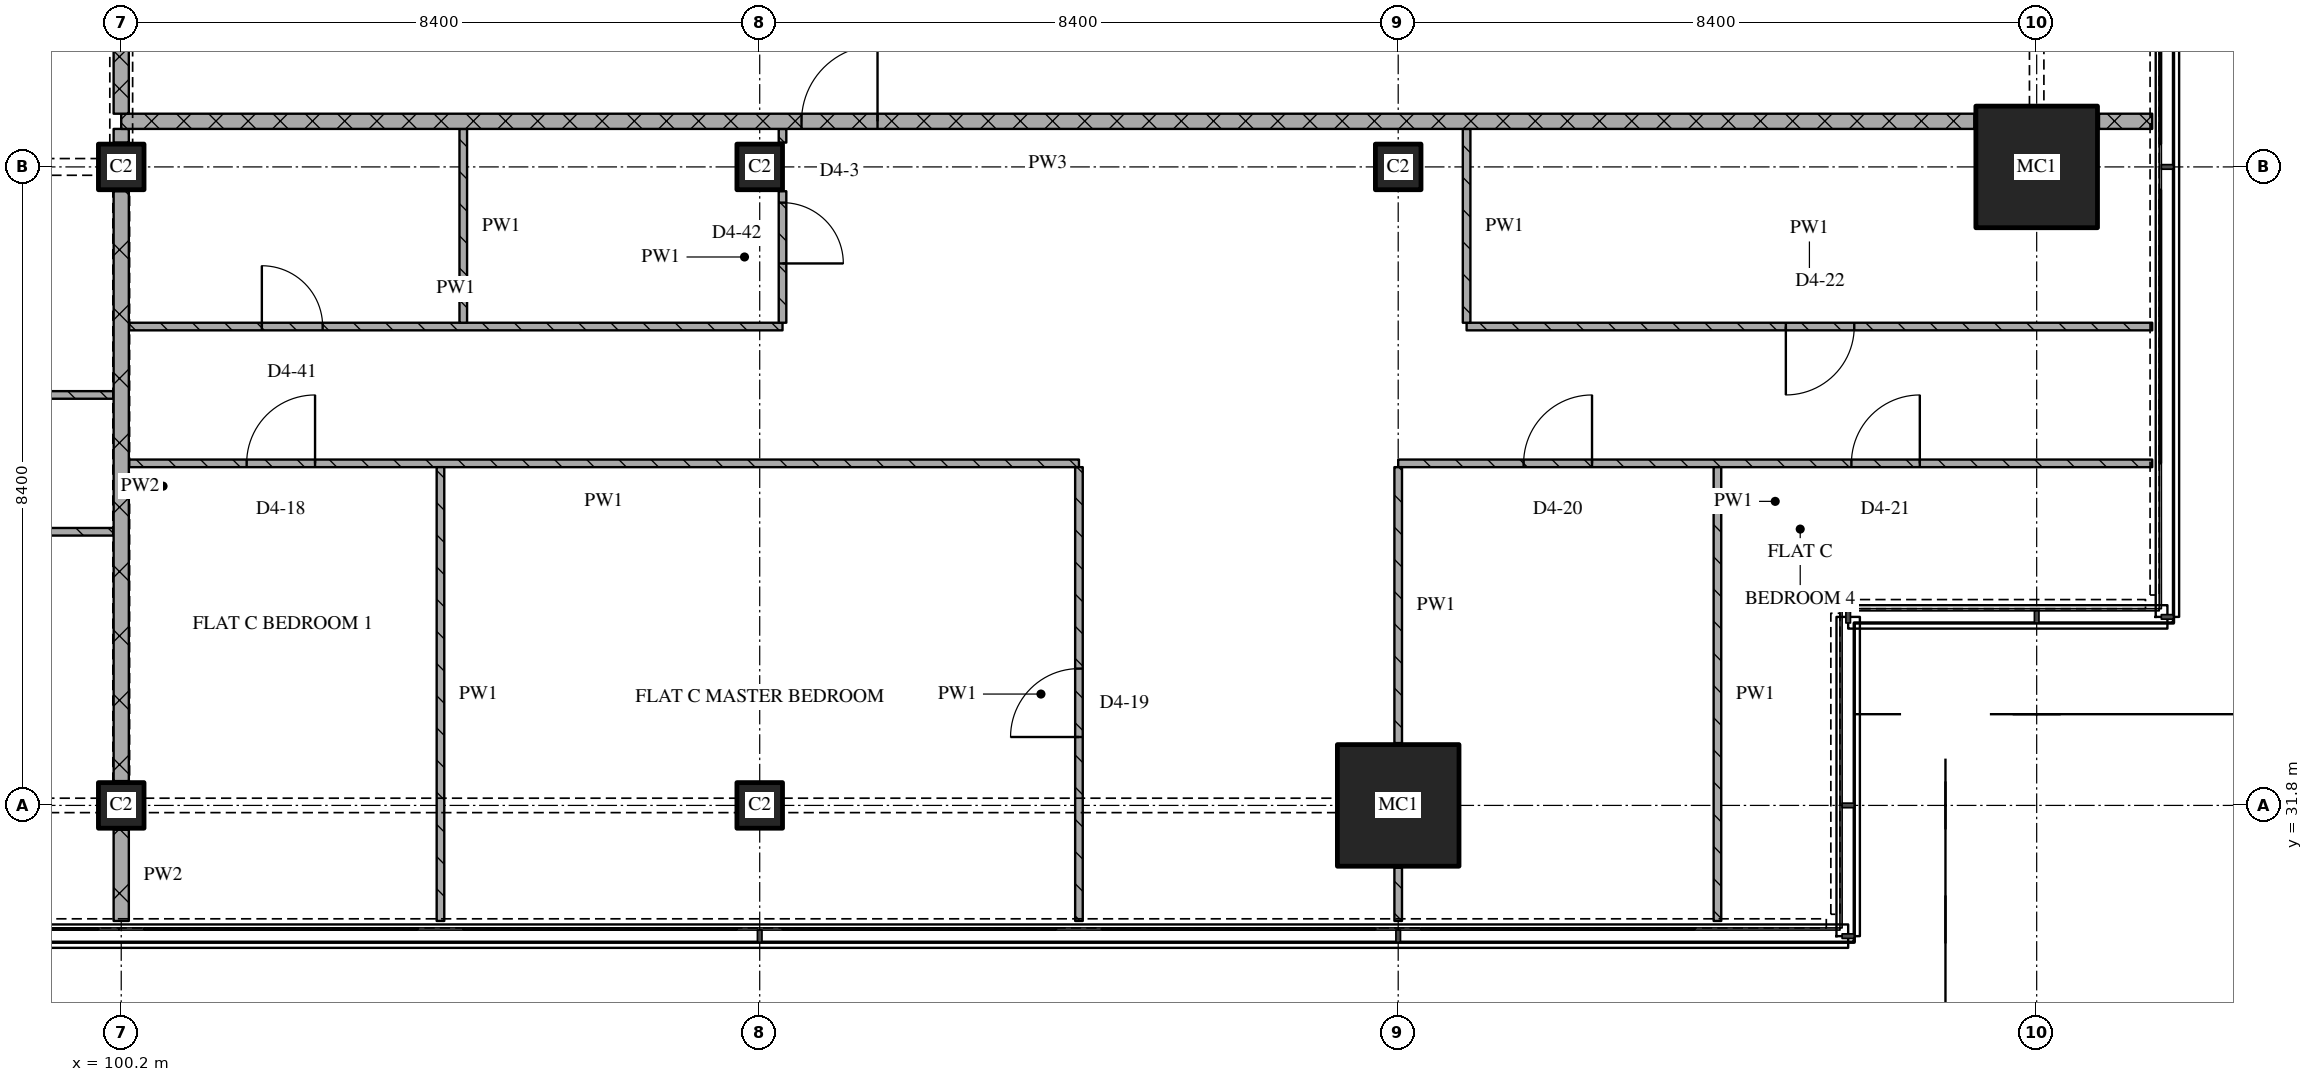
"""IFC4 building model, lengths in metres.
Left out: names, types, materials, properties, quantities, classifications, styles, units other than length and angle.
Written with IfcOpenShell. Run it as: python <this file> out.ifc"""

import sys

from ifc_helpers import new_model, si_unit, direction, frame, frame_2d, origin, origin_2d, place, context, subcontext, project, spatial, rectangle, extrude, element, fill, save


model = new_model("IFC4")
c1 = context("Model", 3, precision=1e-05, world=origin(), true_north=direction((0.0, 1.0)))
c2 = subcontext(c1, "Body", "Model", "MODEL_VIEW")
j1 = project(units=[si_unit("LENGTHUNIT", "METRE"), si_unit("PLANEANGLEUNIT", "RADIAN")], contexts=[c1])
p1 = place(None, origin())
s1 = spatial("IfcSite", under=j1, at=p1, CompositionType="ELEMENT")
p2 = place(p1, origin())
s2 = spatial("IfcBuilding", under=s1, at=p2, CompositionType="ELEMENT")
p3 = place(p2, frame((0.0, 0.0, 237.9)))
s3 = spatial("IfcBuildingStorey", under=s2, at=p3, CompositionType="ELEMENT", Elevation=237.9)
for number, where, z_axis, x_axis in (
    (1, (100.2, 31.8, 0.0), (0.0, 0.0, 1.0), (1.0, 0.0, 0.0)),
    (2, (100.2, 40.2, 0.0), (0.0, 0.0, 1.0), (1.0, 0.0, 0.0)),
    (3, (108.6, 31.8, 0.0), (0.0, 0.0, 1.0), (1.0, 0.0, 0.0)),
    (4, (108.6, 40.2, 0.0), (0.0, 0.0, 1.0), (1.0, 0.0, 0.0)),
):
    element("IfcColumn", number, at=place(p3, frame(where, z_axis=z_axis, x_axis=x_axis)), inside=s3, PredefinedType="COLUMN", context=c2, shape_type="SweptSolid", body=[
        extrude(rectangle(XDim=0.6, YDim=0.6, at=origin_2d()), origin(), (0.0, 0.0, 1.0), 3.6),
    ])
p4 = place(p3, frame((117.0, 31.8, 0.0), z_axis=(0.0, 0.0, 1.0), x_axis=(1.0, 0.0, 0.0)))
e5 = element("IfcColumn", 5, at=p4, inside=s3, PredefinedType="COLUMN", context=c2, shape_type="SweptSolid", body=[
    extrude(rectangle(XDim=1.6, YDim=1.6, at=origin_2d()), origin(), (0.0, 0.0, 1.0), 3.6),
])
p5 = place(p3, frame((117.0, 40.2, 0.0), z_axis=(0.0, 0.0, 1.0), x_axis=(1.0, 0.0, 0.0)))
e6 = element("IfcColumn", 6, at=p5, inside=s3, PredefinedType="COLUMN", context=c2, shape_type="SweptSolid", body=[
    extrude(rectangle(XDim=0.6, YDim=0.6, at=origin_2d()), origin(), (0.0, 0.0, 1.0), 3.6),
])
p6 = place(p3, frame((125.4, 40.2, 0.0), z_axis=(0.0, 0.0, 1.0), x_axis=(1.0, 0.0, 0.0)))
e7 = element("IfcColumn", 7, at=p6, inside=s3, PredefinedType="COLUMN", context=c2, shape_type="SweptSolid", body=[
    extrude(rectangle(XDim=1.6, YDim=1.6, at=origin_2d()), origin(), (0.0, 0.0, 1.0), 3.6),
])
p7 = place(p3, frame((100.1, 35.4, 0.0), z_axis=(0.0, 0.0, 1.0), x_axis=(-1.0, 0.0, 0.0)))
e8 = element("IfcWall", 8, at=p7, inside=s3, PredefinedType="PARTITIONING", context=c2, shape_type="SweptSolid", body=[
    extrude(rectangle(XDim=20.9, YDim=0.1, at=frame_2d((10.45, 0.0))), origin(), (0.0, 0.0, 1.0), 3.32),
])
p8 = place(p7, frame((1.55, 0.0, 0.0)))
e9 = element("IfcOpeningElement", 9, at=p8, cuts=e8, PredefinedType="OPENING", context=c2, shape_type="SweptSolid", body=[
    extrude(rectangle(XDim=0.9, YDim=2.1, at=frame_2d((0.45, 1.05))), frame((0.0, 0.06, 0.0), z_axis=(0.0, -1.0, 0.0), x_axis=(1.0, 0.0, 0.0)), (0.0, 0.0, 1.0), 0.12),
])
p9 = place(p7, frame((7.85, 0.0, 0.0)))
e10 = element("IfcOpeningElement", 10, at=p9, cuts=e8, PredefinedType="OPENING", context=c2, shape_type="SweptSolid", body=[
    extrude(rectangle(XDim=0.9, YDim=2.1, at=frame_2d((0.45, 1.05))), frame((0.0, 0.06, 0.0), z_axis=(0.0, -1.0, 0.0), x_axis=(1.0, 0.0, 0.0)), (0.0, 0.0, 1.0), 0.12),
])
p10 = place(p7, frame((16.25, 0.0, 0.0)))
e11 = element("IfcOpeningElement", 11, at=p10, cuts=e8, PredefinedType="OPENING", context=c2, shape_type="SweptSolid", body=[
    extrude(rectangle(XDim=0.9, YDim=2.1, at=frame_2d((0.45, 1.05))), frame((0.0, 0.06, 0.0), z_axis=(0.0, -1.0, 0.0), x_axis=(1.0, 0.0, 0.0)), (0.0, 0.0, 1.0), 0.12),
])
p11 = place(p3, frame((112.8, 36.3, 0.0), z_axis=(0.0, 0.0, 1.0), x_axis=(-1.0, 0.0, 0.0)))
e12 = element("IfcWall", 12, at=p11, inside=s3, PredefinedType="PARTITIONING", context=c2, shape_type="SweptSolid", body=[
    extrude(rectangle(XDim=12.5, YDim=0.1, at=frame_2d((6.25, 0.0))), origin(), (0.0, 0.0, 1.0), 3.32),
])
p12 = place(p11, frame((10.05, 0.0, 0.0)))
e13 = element("IfcOpeningElement", 13, at=p12, cuts=e12, PredefinedType="OPENING", context=c2, shape_type="SweptSolid", body=[
    extrude(rectangle(XDim=0.9, YDim=2.1, at=frame_2d((0.45, 1.05))), frame((0.0, 0.06, 0.0), z_axis=(0.0, -1.0, 0.0), x_axis=(1.0, 0.0, 0.0)), (0.0, 0.0, 1.0), 0.12),
])
p13 = place(p3, frame((126.92, 36.3, 0.0), z_axis=(0.0, 0.0, 1.0), x_axis=(-1.0, 0.0, 0.0)))
e14 = element("IfcWall", 14, at=p13, inside=s3, PredefinedType="PARTITIONING", context=c2, shape_type="SweptSolid", body=[
    extrude(rectangle(XDim=9.92, YDim=0.1, at=frame_2d((4.96, 0.0))), origin(), (0.0, 0.0, 1.0), 3.32),
])
p14 = place(p13, frame((3.058, 0.0, 0.0)))
e15 = element("IfcOpeningElement", 15, at=p14, cuts=e14, PredefinedType="OPENING", context=c2, shape_type="SweptSolid", body=[
    extrude(rectangle(XDim=0.9, YDim=2.1, at=frame_2d((0.45, 1.05))), frame((0.0, 0.06, 0.0), z_axis=(0.0, -1.0, 0.0), x_axis=(1.0, 0.0, 0.0)), (0.0, 0.0, 1.0), 0.12),
])
p15 = place(p13, frame((7.37, 0.0, 0.0)))
e16 = element("IfcOpeningElement", 16, at=p15, cuts=e14, PredefinedType="OPENING", context=c2, shape_type="SweptSolid", body=[
    extrude(rectangle(XDim=0.9, YDim=2.1, at=frame_2d((0.45, 1.05))), frame((0.0, 0.06, 0.0), z_axis=(0.0, -1.0, 0.0), x_axis=(1.0, 0.0, 0.0)), (0.0, 0.0, 1.0), 0.12),
])
p16 = place(p3, frame((91.2, 37.2, 0.0), z_axis=(0.0, 0.0, 1.0), x_axis=(1.0, 0.0, 0.0)))
e17 = element("IfcWall", 17, at=p16, inside=s3, PredefinedType="PARTITIONING", context=c2, shape_type="SweptSolid", body=[
    extrude(rectangle(XDim=8.9, YDim=0.1, at=frame_2d((4.45, 0.0))), origin(), (0.0, 0.0, 1.0), 3.32),
])
p17 = place(p16, frame((6.308, 0.0, 0.0)))
e18 = element("IfcOpeningElement", 18, at=p17, cuts=e17, PredefinedType="OPENING", context=c2, shape_type="SweptSolid", body=[
    extrude(rectangle(XDim=0.8, YDim=2.1, at=frame_2d((0.4, 1.05))), frame((0.0, 0.06, 0.0), z_axis=(0.0, -1.0, 0.0), x_axis=(1.0, 0.0, 0.0)), (0.0, 0.0, 1.0), 0.12),
])
p18 = place(p3, frame((100.3, 38.1, 0.0), z_axis=(0.0, 0.0, 1.0), x_axis=(1.0, 0.0, 0.0)))
e19 = element("IfcWall", 19, at=p18, inside=s3, PredefinedType="PARTITIONING", context=c2, shape_type="SweptSolid", body=[
    extrude(rectangle(XDim=8.6, YDim=0.1, at=frame_2d((4.3, 0.0))), origin(), (0.0, 0.0, 1.0), 3.32),
])
p19 = place(p18, frame((1.75, 0.0, 0.0)))
e20 = element("IfcOpeningElement", 20, at=p19, cuts=e19, PredefinedType="OPENING", context=c2, shape_type="SweptSolid", body=[
    extrude(rectangle(XDim=0.8, YDim=2.1, at=frame_2d((0.4, 1.05))), frame((0.0, 0.06, 0.0), z_axis=(0.0, -1.0, 0.0), x_axis=(1.0, 0.0, 0.0)), (0.0, 0.0, 1.0), 0.12),
])
p20 = place(p3, frame((117.9, 38.1, 0.0), z_axis=(0.0, 0.0, 1.0), x_axis=(1.0, 0.0, 0.0)))
e21 = element("IfcWall", 21, at=p20, inside=s3, PredefinedType="PARTITIONING", context=c2, shape_type="SweptSolid", body=[
    extrude(rectangle(XDim=9.02, YDim=0.1, at=frame_2d((4.51, 0.0))), origin(), (0.0, 0.0, 1.0), 3.32),
])
p21 = place(p20, frame((4.2, 0.0, 0.0)))
e22 = element("IfcOpeningElement", 22, at=p21, cuts=e21, PredefinedType="OPENING", context=c2, shape_type="SweptSolid", body=[
    extrude(rectangle(XDim=0.9, YDim=2.1, at=frame_2d((0.45, 1.05))), frame((0.0, 0.06, 0.0), z_axis=(0.0, -1.0, 0.0), x_axis=(1.0, 0.0, 0.0)), (0.0, 0.0, 1.0), 0.12),
])
p22 = place(p3, frame((124.58, 40.8, 0.0), z_axis=(0.0, 0.0, 1.0), x_axis=(-1.0, 0.0, 0.0)))
e23 = element("IfcWall", 23, at=p22, inside=s3, PredefinedType="PARTITIONING", context=c2, shape_type="SweptSolid", body=[
    extrude(rectangle(XDim=24.38, YDim=0.2, at=frame_2d((12.19, 0.0))), origin(), (0.0, 0.0, 1.0), 3.32),
])
p23 = place(p22, frame((14.43, 0.0, 0.0)))
e24 = element("IfcOpeningElement", 24, at=p23, cuts=e23, PredefinedType="OPENING", context=c2, shape_type="SweptSolid", body=[
    extrude(rectangle(XDim=1.0, YDim=2.1, at=frame_2d((0.5, 1.05))), frame((0.0, 0.11, 0.0), z_axis=(0.0, -1.0, 0.0), x_axis=(1.0, 0.0, 0.0)), (0.0, 0.0, 1.0), 0.22),
])
p24 = place(p3, frame((126.22, 40.8, 0.0), z_axis=(0.0, 0.0, 1.0), x_axis=(1.0, 0.0, 0.0)))
e25 = element("IfcWall", 25, at=p24, inside=s3, PredefinedType="PARTITIONING", context=c2, shape_type="SweptSolid", body=[
    extrude(rectangle(XDim=0.7, YDim=0.2, at=frame_2d((0.35, 0.0))), origin(), (0.0, 0.0, 1.0), 3.32),
])
p25 = place(p3, frame((100.2, 43.1, 0.0), z_axis=(0.0, 0.0, 1.0), x_axis=(0.0, -1.0, 0.0)))
e26 = element("IfcWall", 26, at=p25, inside=s3, PredefinedType="PARTITIONING", context=c2, shape_type="SweptSolid", body=[
    extrude(rectangle(XDim=2.2, YDim=0.2, at=frame_2d((1.1, 0.0))), origin(), (0.0, 0.0, 1.0), 2.53),
])
p26 = place(p3, frame((100.2, 31.48, 0.0), z_axis=(0.0, 0.0, 1.0), x_axis=(0.0, -1.0, 0.0)))
e27 = element("IfcWall", 27, at=p26, inside=s3, PredefinedType="PARTITIONING", context=c2, shape_type="SweptSolid", body=[
    extrude(rectangle(XDim=1.2, YDim=0.2, at=frame_2d((0.6, 0.0))), origin(), (0.0, 0.0, 1.0), 3.32),
])
p27 = place(p3, frame((100.2, 39.88, 0.0), z_axis=(0.0, 0.0, 1.0), x_axis=(0.0, -1.0, 0.0)))
e28 = element("IfcWall", 28, at=p27, inside=s3, PredefinedType="PARTITIONING", context=c2, shape_type="SweptSolid", body=[
    extrude(rectangle(XDim=7.76, YDim=0.2, at=frame_2d((3.88, 0.0))), origin(), (0.0, 0.0, 1.0), 2.72),
])
p28 = place(p3, frame((100.2, 40.7, 0.0), z_axis=(0.0, 0.0, 1.0), x_axis=(0.0, -1.0, 0.0)))
e29 = element("IfcWall", 29, at=p28, inside=s3, PredefinedType="PARTITIONING", context=c2, shape_type="SweptSolid", body=[
    extrude(rectangle(XDim=0.18, YDim=0.2, at=frame_2d((0.09, 0.0))), origin(), (0.0, 0.0, 1.0), 3.32),
])
p29 = place(p3, frame((104.4, 36.25, 0.0), z_axis=(0.0, 0.0, 1.0), x_axis=(0.0, -1.0, 0.0)))
e30 = element("IfcWall", 30, at=p29, inside=s3, PredefinedType="PARTITIONING", context=c2, shape_type="SweptSolid", body=[
    extrude(rectangle(XDim=5.97, YDim=0.1, at=frame_2d((2.985, 0.0))), origin(), (0.0, 0.0, 1.0), 3.32),
])
p30 = place(p3, frame((104.7, 40.7, 0.0), z_axis=(0.0, 0.0, 1.0), x_axis=(0.0, -1.0, 0.0)))
e31 = element("IfcWall", 31, at=p30, inside=s3, PredefinedType="PARTITIONING", context=c2, shape_type="SweptSolid", body=[
    extrude(rectangle(XDim=2.55, YDim=0.1, at=frame_2d((1.275, 0.0))), origin(), (0.0, 0.0, 1.0), 3.32),
])
p31 = place(p3, frame((108.9, 38.15, 0.0), z_axis=(0.0, 0.0, 1.0), x_axis=(0.0, 1.0, 0.0)))
e32 = element("IfcWall", 32, at=p31, inside=s3, PredefinedType="PARTITIONING", context=c2, shape_type="SweptSolid", body=[
    extrude(rectangle(XDim=1.73, YDim=0.1, at=frame_2d((0.865, 0.0))), origin(), (0.0, 0.0, 1.0), 3.32),
])
p32 = place(p31, frame((0.78, 0.0, 0.0)))
e33 = element("IfcOpeningElement", 33, at=p32, cuts=e32, PredefinedType="OPENING", context=c2, shape_type="SweptSolid", body=[
    extrude(rectangle(XDim=0.8, YDim=2.1, at=frame_2d((0.4, 1.05))), frame((0.0, 0.06, 0.0), z_axis=(0.0, -1.0, 0.0), x_axis=(1.0, 0.0, 0.0)), (0.0, 0.0, 1.0), 0.12),
])
p33 = place(p3, frame((108.9, 40.7, 0.0), z_axis=(0.0, 0.0, 1.0), x_axis=(0.0, -1.0, 0.0)))
e34 = element("IfcWall", 34, at=p33, inside=s3, PredefinedType="PARTITIONING", context=c2, shape_type="SweptSolid", body=[
    extrude(rectangle(XDim=0.18, YDim=0.1, at=frame_2d((0.09, 0.0))), origin(), (0.0, 0.0, 1.0), 3.32),
])
p34 = place(p3, frame((112.8, 30.28, 0.0), z_axis=(0.0, 0.0, 1.0), x_axis=(0.0, 1.0, 0.0)))
e35 = element("IfcWall", 35, at=p34, inside=s3, PredefinedType="PARTITIONING", context=c2, shape_type="SweptSolid", body=[
    extrude(rectangle(XDim=5.97, YDim=0.1, at=frame_2d((2.985, 0.0))), origin(), (0.0, 0.0, 1.0), 3.32),
])
p35 = place(p34, frame((2.42, 0.0, 0.0)))
e36 = element("IfcOpeningElement", 36, at=p35, cuts=e35, PredefinedType="OPENING", context=c2, shape_type="SweptSolid", body=[
    extrude(rectangle(XDim=0.9, YDim=2.1, at=frame_2d((0.45, 1.05))), frame((0.0, 0.06, 0.0), z_axis=(0.0, -1.0, 0.0), x_axis=(1.0, 0.0, 0.0)), (0.0, 0.0, 1.0), 0.12),
])
p36 = place(p3, frame((117.0, 30.98, 0.0), z_axis=(0.0, 0.0, 1.0), x_axis=(0.0, -1.0, 0.0)))
e37 = element("IfcWall", 37, at=p36, inside=s3, PredefinedType="PARTITIONING", context=c2, shape_type="SweptSolid", body=[
    extrude(rectangle(XDim=0.7, YDim=0.1, at=frame_2d((0.35, 0.0))), origin(), (0.0, 0.0, 1.0), 3.32),
])
p37 = place(p3, frame((117.0, 36.25, 0.0), z_axis=(0.0, 0.0, 1.0), x_axis=(0.0, -1.0, 0.0)))
e38 = element("IfcWall", 38, at=p37, inside=s3, PredefinedType="PARTITIONING", context=c2, shape_type="SweptSolid", body=[
    extrude(rectangle(XDim=3.63, YDim=0.1, at=frame_2d((1.815, 0.0))), origin(), (0.0, 0.0, 1.0), 3.32),
])
p38 = place(p3, frame((117.9, 40.7, 0.0), z_axis=(0.0, 0.0, 1.0), x_axis=(0.0, -1.0, 0.0)))
e39 = element("IfcWall", 39, at=p38, inside=s3, PredefinedType="PARTITIONING", context=c2, shape_type="SweptSolid", body=[
    extrude(rectangle(XDim=2.55, YDim=0.1, at=frame_2d((1.275, 0.0))), origin(), (0.0, 0.0, 1.0), 3.32),
])
p39 = place(p3, frame((121.2, 36.25, 0.0), z_axis=(0.0, 0.0, 1.0), x_axis=(0.0, -1.0, 0.0)))
e40 = element("IfcWall", 40, at=p39, inside=s3, PredefinedType="PARTITIONING", context=c2, shape_type="SweptSolid", body=[
    extrude(rectangle(XDim=5.97, YDim=0.1, at=frame_2d((2.985, 0.0))), origin(), (0.0, 0.0, 1.0), 3.32),
])
p40 = place(p12, origin())
e41 = element("IfcDoor", 41, at=p40, inside=s3, OperationType="SINGLE_SWING_RIGHT", PredefinedType="DOOR", context=c2, shape_type="SweptSolid", body=[
    extrude(rectangle(XDim=0.9, YDim=2.1, at=frame_2d((0.45, 1.05))), frame((0.0, 0.025, 0.0), z_axis=(0.0, -1.0, 0.0), x_axis=(1.0, 0.0, 0.0)), (0.0, 0.0, 1.0), 0.05),
])
fill(e13, e41)
p41 = place(p14, origin())
e42 = element("IfcDoor", 42, at=p41, inside=s3, OperationType="SINGLE_SWING_RIGHT", PredefinedType="DOOR", context=c2, shape_type="SweptSolid", body=[
    extrude(rectangle(XDim=0.9, YDim=2.1, at=frame_2d((0.45, 1.05))), frame((0.0, 0.025, 0.0), z_axis=(0.0, -1.0, 0.0), x_axis=(1.0, 0.0, 0.0)), (0.0, 0.0, 1.0), 0.05),
])
fill(e15, e42)
p42 = place(p15, origin())
e43 = element("IfcDoor", 43, at=p42, inside=s3, OperationType="SINGLE_SWING_RIGHT", PredefinedType="DOOR", context=c2, shape_type="SweptSolid", body=[
    extrude(rectangle(XDim=0.9, YDim=2.1, at=frame_2d((0.45, 1.05))), frame((0.0, 0.025, 0.0), z_axis=(0.0, -1.0, 0.0), x_axis=(1.0, 0.0, 0.0)), (0.0, 0.0, 1.0), 0.05),
])
fill(e16, e43)
p43 = place(p19, origin())
e44 = element("IfcDoor", 44, at=p43, inside=s3, OperationType="SINGLE_SWING_LEFT", PredefinedType="DOOR", context=c2, shape_type="SweptSolid", body=[
    extrude(rectangle(XDim=0.8, YDim=2.1, at=frame_2d((0.4, 1.05))), frame((0.0, 0.025, 0.0), z_axis=(0.0, -1.0, 0.0), x_axis=(1.0, 0.0, 0.0)), (0.0, 0.0, 1.0), 0.05),
])
fill(e20, e44)
p44 = place(p21, origin())
e45 = element("IfcDoor", 45, at=p44, inside=s3, OperationType="SINGLE_SWING_RIGHT", PredefinedType="DOOR", context=c2, shape_type="SweptSolid", body=[
    extrude(rectangle(XDim=0.9, YDim=2.1, at=frame_2d((0.45, 1.05))), frame((0.0, 0.025, 0.0), z_axis=(0.0, -1.0, 0.0), x_axis=(1.0, 0.0, 0.0)), (0.0, 0.0, 1.0), 0.05),
])
fill(e22, e45)
p45 = place(p23, origin())
e46 = element("IfcDoor", 46, at=p45, inside=s3, OperationType="SINGLE_SWING_RIGHT", PredefinedType="DOOR", context=c2, shape_type="SweptSolid", body=[
    extrude(rectangle(XDim=1.0, YDim=2.1, at=frame_2d((0.5, 1.05))), frame((0.0, 0.025, 0.0), z_axis=(0.0, -1.0, 0.0), x_axis=(1.0, 0.0, 0.0)), (0.0, 0.0, 1.0), 0.05),
])
fill(e24, e46)
p46 = place(p32, origin())
e47 = element("IfcDoor", 47, at=p46, inside=s3, OperationType="SINGLE_SWING_RIGHT", PredefinedType="DOOR", context=c2, shape_type="SweptSolid", body=[
    extrude(rectangle(XDim=0.8, YDim=2.1, at=frame_2d((0.4, 1.05))), frame((0.0, 0.025, 0.0), z_axis=(0.0, -1.0, 0.0), x_axis=(1.0, 0.0, 0.0)), (0.0, 0.0, 1.0), 0.05),
])
fill(e33, e47)
p47 = place(p35, origin())
e48 = element("IfcDoor", 48, at=p47, inside=s3, OperationType="SINGLE_SWING_LEFT", PredefinedType="DOOR", context=c2, shape_type="SweptSolid", body=[
    extrude(rectangle(XDim=0.9, YDim=2.1, at=frame_2d((0.45, 1.05))), frame((0.0, 0.025, 0.0), z_axis=(0.0, -1.0, 0.0), x_axis=(1.0, 0.0, 0.0)), (0.0, 0.0, 1.0), 0.05),
])
fill(e36, e48)
save(model, sys.argv[1])
